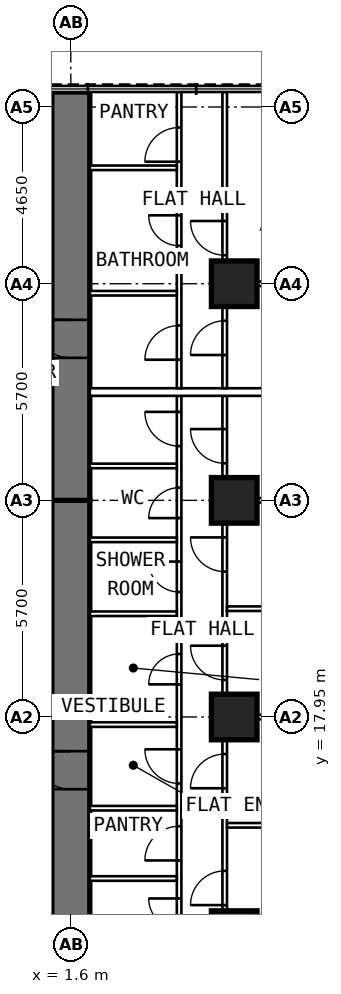
"""IFC4 building model, lengths in metres.
Left out: names, types, materials, properties, quantities, classifications, styles, units other than length and angle.
Written with IfcOpenShell. Run it as: python <this file> out.ifc"""

import sys

from ifc_helpers import new_model, si_unit, direction, frame, frame_2d, origin, origin_2d, place, context, subcontext, project, spatial, rectangle, extrude, element, fill, save


model = new_model("IFC4")
c1 = context("Model", 3, precision=1e-05, world=origin(), true_north=direction((0.0, 1.0)))
c2 = subcontext(c1, "Body", "Model", "MODEL_VIEW")
j1 = project(units=[si_unit("LENGTHUNIT", "METRE"), si_unit("PLANEANGLEUNIT", "RADIAN")], contexts=[c1])
p1 = place(None, origin())
s1 = spatial("IfcSite", under=j1, at=p1, CompositionType="ELEMENT")
p2 = place(p1, origin())
s2 = spatial("IfcBuilding", under=s1, at=p2, CompositionType="ELEMENT")
p3 = place(p2, frame((0.0, 0.0, 50.2)))
s3 = spatial("IfcBuildingStorey", under=s2, at=p3, CompositionType="ELEMENT", Elevation=50.2)
for number, where, z_axis, x_axis in (
    (1, (5.9, 12.25, 0.0), (0.0, 0.0, 1.0), (0.0, 1.0, 0.0)),
    (2, (5.9, 17.95, 0.0), (0.0, 0.0, 1.0), (0.0, 1.0, 0.0)),
    (3, (5.9, 23.65, 0.0), (0.0, 0.0, 1.0), (0.0, 1.0, 0.0)),
    (4, (5.9, 29.35, 0.0), (0.0, 0.0, 1.0), (0.0, 1.0, 0.0)),
):
    element("IfcColumn", number, at=place(p3, frame(where, z_axis=z_axis, x_axis=x_axis)), inside=s3, PredefinedType="COLUMN", context=c2, shape_type="SweptSolid", body=[
        extrude(rectangle(XDim=1.2, YDim=1.2, at=origin_2d()), origin(), (0.0, 0.0, 1.0), 3.6),
    ])
p4 = place(p3, frame((1.6, 9.6, 0.0), z_axis=(0.0, 0.0, 1.0), x_axis=(0.0, 1.0, 0.0)))
e5 = element("IfcWall", 5, at=p4, inside=s3, PredefinedType="SHEAR", context=c2, shape_type="SweptSolid", body=[
    extrude(rectangle(XDim=8.35, YDim=1.0, at=frame_2d((4.175, 0.0))), origin(), (0.0, 0.0, 1.0), 3.6),
])
p5 = place(p4, frame((6.45, 0.0, 0.0)))
e6 = element("IfcOpeningElement", 6, at=p5, cuts=e5, PredefinedType="OPENING", context=c2, shape_type="SweptSolid", body=[
    extrude(rectangle(XDim=1.0, YDim=2.1, at=frame_2d((0.5, 1.05))), frame((0.0, 0.512, 0.0), z_axis=(0.0, -1.0, 0.0), x_axis=(1.0, 0.0, 0.0)), (0.0, 0.0, 1.0), 1.024),
])
p6 = place(p3, frame((1.6, 17.95, 0.0), z_axis=(0.0, 0.0, 1.0), x_axis=(0.0, 1.0, 0.0)))
e7 = element("IfcWall", 7, at=p6, inside=s3, PredefinedType="SHEAR", context=c2, shape_type="SweptSolid", body=[
    extrude(rectangle(XDim=5.7, YDim=1.0, at=frame_2d((2.85, 0.0))), origin(), (0.0, 0.0, 1.0), 3.6),
])
p7 = place(p3, frame((1.6, 23.65, 0.0), z_axis=(0.0, 0.0, 1.0), x_axis=(0.0, 1.0, 0.0)))
e8 = element("IfcWall", 8, at=p7, inside=s3, PredefinedType="SHEAR", context=c2, shape_type="SweptSolid", body=[
    extrude(rectangle(XDim=10.745, YDim=1.0, at=frame_2d((5.373, 0.0))), origin(), (0.0, 0.0, 1.0), 3.6),
])
p8 = place(p7, frame((3.75, 0.0, 0.0)))
e9 = element("IfcOpeningElement", 9, at=p8, cuts=e8, PredefinedType="OPENING", context=c2, shape_type="SweptSolid", body=[
    extrude(rectangle(XDim=1.0, YDim=2.1, at=frame_2d((0.5, 1.05))), frame((0.0, 0.512, 0.0), z_axis=(0.0, -1.0, 0.0), x_axis=(1.0, 0.0, 0.0)), (0.0, 0.0, 1.0), 1.024),
])
p9 = place(p3, frame((4.45, 10.1, 0.0), z_axis=(0.0, 0.0, 1.0), x_axis=(0.0, 1.0, 0.0)))
e10 = element("IfcWall", 10, at=p9, inside=s3, PredefinedType="PARTITIONING", context=c2, shape_type="SweptSolid", body=[
    extrude(rectangle(XDim=16.3, YDim=0.12, at=frame_2d((8.15, 0.0))), origin(), (0.0, 0.0, 1.0), 3.35),
])
p10 = place(p9, frame((0.375, 0.0, 0.0)))
e11 = element("IfcOpeningElement", 11, at=p10, cuts=e10, PredefinedType="OPENING", context=c2, shape_type="SweptSolid", body=[
    extrude(rectangle(XDim=0.9, YDim=2.1, at=frame_2d((0.45, 1.05))), frame((0.0, 0.072, 0.0), z_axis=(0.0, -1.0, 0.0), x_axis=(1.0, 0.0, 0.0)), (0.0, 0.0, 1.0), 0.144),
])
p11 = place(p9, frame((2.275, 0.0, 0.0)))
e12 = element("IfcOpeningElement", 12, at=p11, cuts=e10, PredefinedType="OPENING", context=c2, shape_type="SweptSolid", body=[
    extrude(rectangle(XDim=0.8, YDim=2.1, at=frame_2d((0.4, 1.05))), frame((0.0, 0.072, 0.0), z_axis=(0.0, -1.0, 0.0), x_axis=(1.0, 0.0, 0.0)), (0.0, 0.0, 1.0), 0.144),
])
p12 = place(p9, frame((4.075, 0.0, 0.0)))
e13 = element("IfcOpeningElement", 13, at=p12, cuts=e10, PredefinedType="OPENING", context=c2, shape_type="SweptSolid", body=[
    extrude(rectangle(XDim=0.9, YDim=2.1, at=frame_2d((0.45, 1.05))), frame((0.0, 0.072, 0.0), z_axis=(0.0, -1.0, 0.0), x_axis=(1.0, 0.0, 0.0)), (0.0, 0.0, 1.0), 0.144),
])
p13 = place(p9, frame((6.1, 0.0, 0.0)))
e14 = element("IfcOpeningElement", 14, at=p13, cuts=e10, PredefinedType="OPENING", context=c2, shape_type="SweptSolid", body=[
    extrude(rectangle(XDim=0.9, YDim=2.1, at=frame_2d((0.45, 1.05))), frame((0.0, 0.072, 0.0), z_axis=(0.0, -1.0, 0.0), x_axis=(1.0, 0.0, 0.0)), (0.0, 0.0, 1.0), 0.144),
])
p14 = place(p9, frame((8.708, 0.0, 0.0)))
e15 = element("IfcOpeningElement", 15, at=p14, cuts=e10, PredefinedType="OPENING", context=c2, shape_type="SweptSolid", body=[
    extrude(rectangle(XDim=0.8, YDim=2.1, at=frame_2d((0.4, 1.05))), frame((0.0, 0.072, 0.0), z_axis=(0.0, -1.0, 0.0), x_axis=(1.0, 0.0, 0.0)), (0.0, 0.0, 1.0), 0.144),
])
p15 = place(p9, frame((11.139, 0.0, 0.0)))
e16 = element("IfcOpeningElement", 16, at=p15, cuts=e10, PredefinedType="OPENING", context=c2, shape_type="SweptSolid", body=[
    extrude(rectangle(XDim=0.8, YDim=2.1, at=frame_2d((0.4, 1.05))), frame((0.0, 0.072, 0.0), z_axis=(0.0, -1.0, 0.0), x_axis=(1.0, 0.0, 0.0)), (0.0, 0.0, 1.0), 0.144),
])
p16 = place(p9, frame((13.083, 0.0, 0.0)))
e17 = element("IfcOpeningElement", 17, at=p16, cuts=e10, PredefinedType="OPENING", context=c2, shape_type="SweptSolid", body=[
    extrude(rectangle(XDim=0.8, YDim=2.1, at=frame_2d((0.4, 1.05))), frame((0.0, 0.072, 0.0), z_axis=(0.0, -1.0, 0.0), x_axis=(1.0, 0.0, 0.0)), (0.0, 0.0, 1.0), 0.144),
])
p17 = place(p9, frame((14.978, 0.0, 0.0)))
e18 = element("IfcOpeningElement", 18, at=p17, cuts=e10, PredefinedType="OPENING", context=c2, shape_type="SweptSolid", body=[
    extrude(rectangle(XDim=0.9, YDim=2.1, at=frame_2d((0.45, 1.05))), frame((0.0, 0.072, 0.0), z_axis=(0.0, -1.0, 0.0), x_axis=(1.0, 0.0, 0.0)), (0.0, 0.0, 1.0), 0.144),
])
p18 = place(p3, frame((5.65, 9.6, 0.0), z_axis=(0.0, 0.0, 1.0), x_axis=(0.0, 1.0, 0.0)))
e19 = element("IfcWall", 19, at=p18, inside=s3, PredefinedType="PARTITIONING", context=c2, shape_type="SweptSolid", body=[
    extrude(rectangle(XDim=16.8, YDim=0.12, at=frame_2d((8.4, 0.0))), origin(), (0.0, 0.0, 1.0), 3.35),
])
p19 = place(p18, frame((3.4, 0.0, 0.0)))
e20 = element("IfcOpeningElement", 20, at=p19, cuts=e19, PredefinedType="OPENING", context=c2, shape_type="SweptSolid", body=[
    extrude(rectangle(XDim=0.9, YDim=2.1, at=frame_2d((0.45, 1.05))), frame((0.0, 0.072, 0.0), z_axis=(0.0, -1.0, 0.0), x_axis=(1.0, 0.0, 0.0)), (0.0, 0.0, 1.0), 0.144),
])
p20 = place(p18, frame((6.475, 0.0, 0.0)))
e21 = element("IfcOpeningElement", 21, at=p20, cuts=e19, PredefinedType="OPENING", context=c2, shape_type="SweptSolid", body=[
    extrude(rectangle(XDim=0.9, YDim=2.1, at=frame_2d((0.45, 1.05))), frame((0.0, 0.072, 0.0), z_axis=(0.0, -1.0, 0.0), x_axis=(1.0, 0.0, 0.0)), (0.0, 0.0, 1.0), 0.144),
])
p21 = place(p18, frame((9.325, 0.0, 0.0)))
e22 = element("IfcOpeningElement", 22, at=p21, cuts=e19, PredefinedType="OPENING", context=c2, shape_type="SweptSolid", body=[
    extrude(rectangle(XDim=0.9, YDim=2.1, at=frame_2d((0.45, 1.05))), frame((0.0, 0.072, 0.0), z_axis=(0.0, -1.0, 0.0), x_axis=(1.0, 0.0, 0.0)), (0.0, 0.0, 1.0), 0.144),
])
p22 = place(p18, frame((12.175, 0.0, 0.0)))
e23 = element("IfcOpeningElement", 23, at=p22, cuts=e19, PredefinedType="OPENING", context=c2, shape_type="SweptSolid", body=[
    extrude(rectangle(XDim=0.9, YDim=2.1, at=frame_2d((0.45, 1.05))), frame((0.0, 0.072, 0.0), z_axis=(0.0, -1.0, 0.0), x_axis=(1.0, 0.0, 0.0)), (0.0, 0.0, 1.0), 0.144),
])
p23 = place(p18, frame((15.025, 0.0, 0.0)))
e24 = element("IfcOpeningElement", 24, at=p23, cuts=e19, PredefinedType="OPENING", context=c2, shape_type="SweptSolid", body=[
    extrude(rectangle(XDim=0.9, YDim=2.1, at=frame_2d((0.45, 1.05))), frame((0.0, 0.072, 0.0), z_axis=(0.0, -1.0, 0.0), x_axis=(1.0, 0.0, 0.0)), (0.0, 0.0, 1.0), 0.144),
])
p24 = place(p3, frame((5.71, 15.1, 0.0), z_axis=(0.0, 0.0, 1.0), x_axis=(1.0, 0.0, 0.0)))
e25 = element("IfcWall", 25, at=p24, inside=s3, PredefinedType="PARTITIONING", context=c2, shape_type="SweptSolid", body=[
    extrude(rectangle(XDim=4.99, YDim=0.12, at=frame_2d((2.495, 0.0))), origin(), (0.0, 0.0, 1.0), 3.35),
])
p25 = place(p3, frame((5.71, 17.95, 0.0), z_axis=(0.0, 0.0, 1.0), x_axis=(1.0, 0.0, 0.0)))
e26 = element("IfcWall", 26, at=p25, inside=s3, PredefinedType="PARTITIONING", context=c2, shape_type="SweptSolid", body=[
    extrude(rectangle(XDim=4.99, YDim=0.12, at=frame_2d((2.495, 0.0))), origin(), (0.0, 0.0, 1.0), 2.45),
])
p26 = place(p3, frame((5.71, 20.8, 0.0), z_axis=(0.0, 0.0, 1.0), x_axis=(1.0, 0.0, 0.0)))
e27 = element("IfcWall", 27, at=p26, inside=s3, PredefinedType="PARTITIONING", context=c2, shape_type="SweptSolid", body=[
    extrude(rectangle(XDim=4.99, YDim=0.12, at=frame_2d((2.495, 0.0))), origin(), (0.0, 0.0, 1.0), 3.35),
])
p27 = place(p3, frame((5.71, 23.65, 0.0), z_axis=(0.0, 0.0, 1.0), x_axis=(1.0, 0.0, 0.0)))
e28 = element("IfcWall", 28, at=p27, inside=s3, PredefinedType="PARTITIONING", context=c2, shape_type="SweptSolid", body=[
    extrude(rectangle(XDim=4.99, YDim=0.12, at=frame_2d((2.495, 0.0))), origin(), (0.0, 0.0, 1.0), 2.45),
])
for number, where, z_axis, x_axis in (
    (29, (2.1, 13.7, 0.0), (0.0, 0.0, 1.0), (1.0, 0.0, 0.0)),
    (30, (2.1, 15.55, 0.0), (0.0, 0.0, 1.0), (1.0, 0.0, 0.0)),
):
    element("IfcWall", number, at=place(p3, frame(where, z_axis=z_axis, x_axis=x_axis)), inside=s3, PredefinedType="PARTITIONING", context=c2, shape_type="SweptSolid", body=[
        extrude(rectangle(XDim=2.29, YDim=0.12, at=frame_2d((1.145, 0.0))), origin(), (0.0, 0.0, 1.0), 3.35),
    ])
p28 = place(p3, frame((2.1, 17.75, 0.0), z_axis=(0.0, 0.0, 1.0), x_axis=(1.0, 0.0, 0.0)))
e31 = element("IfcWall", 31, at=p28, inside=s3, PredefinedType="PARTITIONING", context=c2, shape_type="SweptSolid", body=[
    extrude(rectangle(XDim=2.29, YDim=0.12, at=frame_2d((1.145, 0.0))), origin(), (0.0, 0.0, 1.0), 2.45),
])
for number, where, z_axis, x_axis in (
    (32, (2.1, 20.667, 0.0), (0.0, 0.0, 1.0), (1.0, 0.0, 0.0)),
    (33, (2.1, 22.611, 0.0), (0.0, 0.0, 1.0), (1.0, 0.0, 0.0)),
    (34, (2.1, 24.556, 0.0), (0.0, 0.0, 1.0), (1.0, 0.0, 0.0)),
):
    element("IfcWall", number, at=place(p3, frame(where, z_axis=z_axis, x_axis=x_axis)), inside=s3, PredefinedType="PARTITIONING", context=c2, shape_type="SweptSolid", body=[
        extrude(rectangle(XDim=2.29, YDim=0.12, at=frame_2d((1.145, 0.0))), origin(), (0.0, 0.0, 1.0), 3.35),
    ])
p29 = place(p3, frame((4.45, 26.6, 0.0), z_axis=(0.0, 0.0, 1.0), x_axis=(0.0, 1.0, 0.0)))
e35 = element("IfcWall", 35, at=p29, inside=s3, PredefinedType="PARTITIONING", context=c2, shape_type="SweptSolid", body=[
    extrude(rectangle(XDim=7.795, YDim=0.12, at=frame_2d((3.897, 0.0))), origin(), (0.0, 0.0, 1.0), 3.35),
])
p30 = place(p29, frame((0.75, 0.0, 0.0)))
e36 = element("IfcOpeningElement", 36, at=p30, cuts=e35, PredefinedType="OPENING", context=c2, shape_type="SweptSolid", body=[
    extrude(rectangle(XDim=0.9, YDim=2.1, at=frame_2d((0.45, 1.05))), frame((0.0, 0.072, 0.0), z_axis=(0.0, -1.0, 0.0), x_axis=(1.0, 0.0, 0.0)), (0.0, 0.0, 1.0), 0.144),
])
p31 = place(p29, frame((3.75, 0.0, 0.0)))
e37 = element("IfcOpeningElement", 37, at=p31, cuts=e35, PredefinedType="OPENING", context=c2, shape_type="SweptSolid", body=[
    extrude(rectangle(XDim=0.8, YDim=2.1, at=frame_2d((0.4, 1.05))), frame((0.0, 0.072, 0.0), z_axis=(0.0, -1.0, 0.0), x_axis=(1.0, 0.0, 0.0)), (0.0, 0.0, 1.0), 0.144),
])
p32 = place(p29, frame((5.96, 0.0, 0.0)))
e38 = element("IfcOpeningElement", 38, at=p32, cuts=e35, PredefinedType="OPENING", context=c2, shape_type="SweptSolid", body=[
    extrude(rectangle(XDim=0.9, YDim=2.1, at=frame_2d((0.45, 1.05))), frame((0.0, 0.072, 0.0), z_axis=(0.0, -1.0, 0.0), x_axis=(1.0, 0.0, 0.0)), (0.0, 0.0, 1.0), 0.144),
])
p33 = place(p3, frame((5.65, 26.6, 0.0), z_axis=(0.0, 0.0, 1.0), x_axis=(0.0, 1.0, 0.0)))
e39 = element("IfcWall", 39, at=p33, inside=s3, PredefinedType="PARTITIONING", context=c2, shape_type="SweptSolid", body=[
    extrude(rectangle(XDim=7.795, YDim=0.12, at=frame_2d((3.897, 0.0))), origin(), (0.0, 0.0, 1.0), 3.35),
])
p34 = place(p33, frame((0.875, 0.0, 0.0)))
e40 = element("IfcOpeningElement", 40, at=p34, cuts=e39, PredefinedType="OPENING", context=c2, shape_type="SweptSolid", body=[
    extrude(rectangle(XDim=0.9, YDim=2.1, at=frame_2d((0.45, 1.05))), frame((0.0, 0.072, 0.0), z_axis=(0.0, -1.0, 0.0), x_axis=(1.0, 0.0, 0.0)), (0.0, 0.0, 1.0), 0.144),
])
p35 = place(p33, frame((3.5, 0.0, 0.0)))
e41 = element("IfcOpeningElement", 41, at=p35, cuts=e39, PredefinedType="OPENING", context=c2, shape_type="SweptSolid", body=[
    extrude(rectangle(XDim=0.9, YDim=2.1, at=frame_2d((0.45, 1.05))), frame((0.0, 0.072, 0.0), z_axis=(0.0, -1.0, 0.0), x_axis=(1.0, 0.0, 0.0)), (0.0, 0.0, 1.0), 0.144),
])
p36 = place(p3, frame((5.71, 29.35, 0.0), z_axis=(0.0, 0.0, 1.0), x_axis=(1.0, 0.0, 0.0)))
e42 = element("IfcWall", 42, at=p36, inside=s3, PredefinedType="PARTITIONING", context=c2, shape_type="SweptSolid", body=[
    extrude(rectangle(XDim=4.99, YDim=0.12, at=frame_2d((2.495, 0.0))), origin(), (0.0, 0.0, 1.0), 2.45),
])
p37 = place(p3, frame((2.1, 29.1, 0.0), z_axis=(0.0, 0.0, 1.0), x_axis=(1.0, 0.0, 0.0)))
e43 = element("IfcWall", 43, at=p37, inside=s3, PredefinedType="PARTITIONING", context=c2, shape_type="SweptSolid", body=[
    extrude(rectangle(XDim=2.29, YDim=0.12, at=frame_2d((1.145, 0.0))), origin(), (0.0, 0.0, 1.0), 2.45),
])
p38 = place(p3, frame((2.1, 32.4, 0.0), z_axis=(0.0, 0.0, 1.0), x_axis=(1.0, 0.0, 0.0)))
e44 = element("IfcWall", 44, at=p38, inside=s3, PredefinedType="PARTITIONING", context=c2, shape_type="SweptSolid", body=[
    extrude(rectangle(XDim=2.29, YDim=0.12, at=frame_2d((1.145, 0.0))), origin(), (0.0, 0.0, 1.0), 3.35),
])
p39 = place(p3, frame((2.1, 26.5, 0.0), z_axis=(0.0, 0.0, 1.0), x_axis=(1.0, 0.0, 0.0)))
e45 = element("IfcWall", 45, at=p39, inside=s3, PredefinedType="PARTITIONING", context=c2, shape_type="SweptSolid", body=[
    extrude(rectangle(XDim=8.6, YDim=0.2, at=frame_2d((4.3, 0.0))), origin(), (0.0, 0.0, 1.0), 3.35),
])
p40 = place(p5, origin())
e46 = element("IfcDoor", 46, at=p40, inside=s3, OperationType="SINGLE_SWING_RIGHT", PredefinedType="DOOR", context=c2, shape_type="SweptSolid", body=[
    extrude(rectangle(XDim=1.0, YDim=2.1, at=frame_2d((0.5, 1.05))), frame((0.0, 0.25, 0.0), z_axis=(0.0, -1.0, 0.0), x_axis=(1.0, 0.0, 0.0)), (0.0, 0.0, 1.0), 0.5),
])
fill(e6, e46)
p41 = place(p19, origin())
e47 = element("IfcDoor", 47, at=p41, inside=s3, OperationType="SINGLE_SWING_LEFT", PredefinedType="DOOR", context=c2, shape_type="SweptSolid", body=[
    extrude(rectangle(XDim=0.9, YDim=2.1, at=frame_2d((0.45, 1.05))), frame((0.0, 0.025, 0.0), z_axis=(0.0, -1.0, 0.0), x_axis=(1.0, 0.0, 0.0)), (0.0, 0.0, 1.0), 0.05),
])
fill(e20, e47)
p42 = place(p20, origin())
e48 = element("IfcDoor", 48, at=p42, inside=s3, OperationType="SINGLE_SWING_LEFT", PredefinedType="DOOR", context=c2, shape_type="SweptSolid", body=[
    extrude(rectangle(XDim=0.9, YDim=2.1, at=frame_2d((0.45, 1.05))), frame((0.0, 0.025, 0.0), z_axis=(0.0, -1.0, 0.0), x_axis=(1.0, 0.0, 0.0)), (0.0, 0.0, 1.0), 0.05),
])
fill(e21, e48)
p43 = place(p21, origin())
e49 = element("IfcDoor", 49, at=p43, inside=s3, OperationType="SINGLE_SWING_RIGHT", PredefinedType="DOOR", context=c2, shape_type="SweptSolid", body=[
    extrude(rectangle(XDim=0.9, YDim=2.1, at=frame_2d((0.45, 1.05))), frame((0.0, 0.025, 0.0), z_axis=(0.0, -1.0, 0.0), x_axis=(1.0, 0.0, 0.0)), (0.0, 0.0, 1.0), 0.05),
])
fill(e22, e49)
p44 = place(p22, origin())
e50 = element("IfcDoor", 50, at=p44, inside=s3, OperationType="SINGLE_SWING_RIGHT", PredefinedType="DOOR", context=c2, shape_type="SweptSolid", body=[
    extrude(rectangle(XDim=0.9, YDim=2.1, at=frame_2d((0.45, 1.05))), frame((0.0, 0.025, 0.0), z_axis=(0.0, -1.0, 0.0), x_axis=(1.0, 0.0, 0.0)), (0.0, 0.0, 1.0), 0.05),
])
fill(e23, e50)
p45 = place(p23, origin())
e51 = element("IfcDoor", 51, at=p45, inside=s3, OperationType="SINGLE_SWING_RIGHT", PredefinedType="DOOR", context=c2, shape_type="SweptSolid", body=[
    extrude(rectangle(XDim=0.9, YDim=2.1, at=frame_2d((0.45, 1.05))), frame((0.0, 0.025, 0.0), z_axis=(0.0, -1.0, 0.0), x_axis=(1.0, 0.0, 0.0)), (0.0, 0.0, 1.0), 0.05),
])
fill(e24, e51)
p46 = place(p11, origin())
e52 = element("IfcDoor", 52, at=p46, inside=s3, OperationType="SINGLE_SWING_RIGHT", PredefinedType="DOOR", context=c2, shape_type="SweptSolid", body=[
    extrude(rectangle(XDim=0.8, YDim=2.1, at=frame_2d((0.4, 1.05))), frame((0.0, 0.025, 0.0), z_axis=(0.0, -1.0, 0.0), x_axis=(1.0, 0.0, 0.0)), (0.0, 0.0, 1.0), 0.05),
])
fill(e12, e52)
p47 = place(p12, origin())
e53 = element("IfcDoor", 53, at=p47, inside=s3, OperationType="SINGLE_SWING_LEFT", PredefinedType="DOOR", context=c2, shape_type="SweptSolid", body=[
    extrude(rectangle(XDim=0.9, YDim=2.1, at=frame_2d((0.45, 1.05))), frame((0.0, 0.025, 0.0), z_axis=(0.0, -1.0, 0.0), x_axis=(1.0, 0.0, 0.0)), (0.0, 0.0, 1.0), 0.05),
])
fill(e13, e53)
p48 = place(p13, origin())
e54 = element("IfcDoor", 54, at=p48, inside=s3, OperationType="SINGLE_SWING_RIGHT", PredefinedType="DOOR", context=c2, shape_type="SweptSolid", body=[
    extrude(rectangle(XDim=0.9, YDim=2.1, at=frame_2d((0.45, 1.05))), frame((0.0, 0.025, 0.0), z_axis=(0.0, -1.0, 0.0), x_axis=(1.0, 0.0, 0.0)), (0.0, 0.0, 1.0), 0.05),
])
fill(e14, e54)
p49 = place(p14, origin())
e55 = element("IfcDoor", 55, at=p49, inside=s3, OperationType="SINGLE_SWING_LEFT", PredefinedType="DOOR", context=c2, shape_type="SweptSolid", body=[
    extrude(rectangle(XDim=0.8, YDim=2.1, at=frame_2d((0.4, 1.05))), frame((0.0, 0.025, 0.0), z_axis=(0.0, -1.0, 0.0), x_axis=(1.0, 0.0, 0.0)), (0.0, 0.0, 1.0), 0.05),
])
fill(e15, e55)
p50 = place(p15, origin())
e56 = element("IfcDoor", 56, at=p50, inside=s3, OperationType="SINGLE_SWING_RIGHT", PredefinedType="DOOR", context=c2, shape_type="SweptSolid", body=[
    extrude(rectangle(XDim=0.8, YDim=2.1, at=frame_2d((0.4, 1.05))), frame((0.0, 0.025, 0.0), z_axis=(0.0, -1.0, 0.0), x_axis=(1.0, 0.0, 0.0)), (0.0, 0.0, 1.0), 0.05),
])
fill(e16, e56)
p51 = place(p16, origin())
e57 = element("IfcDoor", 57, at=p51, inside=s3, OperationType="SINGLE_SWING_LEFT", PredefinedType="DOOR", context=c2, shape_type="SweptSolid", body=[
    extrude(rectangle(XDim=0.8, YDim=2.1, at=frame_2d((0.4, 1.05))), frame((0.0, 0.025, 0.0), z_axis=(0.0, -1.0, 0.0), x_axis=(1.0, 0.0, 0.0)), (0.0, 0.0, 1.0), 0.05),
])
fill(e17, e57)
p52 = place(p17, origin())
e58 = element("IfcDoor", 58, at=p52, inside=s3, OperationType="SINGLE_SWING_RIGHT", PredefinedType="DOOR", context=c2, shape_type="SweptSolid", body=[
    extrude(rectangle(XDim=0.9, YDim=2.1, at=frame_2d((0.45, 1.05))), frame((0.0, 0.025, 0.0), z_axis=(0.0, -1.0, 0.0), x_axis=(1.0, 0.0, 0.0)), (0.0, 0.0, 1.0), 0.05),
])
fill(e18, e58)
p53 = place(p8, origin())
e59 = element("IfcDoor", 59, at=p53, inside=s3, OperationType="SINGLE_SWING_RIGHT", PredefinedType="DOOR", context=c2, shape_type="SweptSolid", body=[
    extrude(rectangle(XDim=1.0, YDim=2.1, at=frame_2d((0.5, 1.05))), frame((0.0, 0.25, 0.0), z_axis=(0.0, -1.0, 0.0), x_axis=(1.0, 0.0, 0.0)), (0.0, 0.0, 1.0), 0.5),
])
fill(e9, e59)
p54 = place(p34, origin())
e60 = element("IfcDoor", 60, at=p54, inside=s3, OperationType="SINGLE_SWING_LEFT", PredefinedType="DOOR", context=c2, shape_type="SweptSolid", body=[
    extrude(rectangle(XDim=0.9, YDim=2.1, at=frame_2d((0.45, 1.05))), frame((0.0, 0.025, 0.0), z_axis=(0.0, -1.0, 0.0), x_axis=(1.0, 0.0, 0.0)), (0.0, 0.0, 1.0), 0.05),
])
fill(e40, e60)
p55 = place(p35, origin())
e61 = element("IfcDoor", 61, at=p55, inside=s3, OperationType="SINGLE_SWING_RIGHT", PredefinedType="DOOR", context=c2, shape_type="SweptSolid", body=[
    extrude(rectangle(XDim=0.9, YDim=2.1, at=frame_2d((0.45, 1.05))), frame((0.0, 0.025, 0.0), z_axis=(0.0, -1.0, 0.0), x_axis=(1.0, 0.0, 0.0)), (0.0, 0.0, 1.0), 0.05),
])
fill(e41, e61)
p56 = place(p30, origin())
e62 = element("IfcDoor", 62, at=p56, inside=s3, OperationType="SINGLE_SWING_LEFT", PredefinedType="DOOR", context=c2, shape_type="SweptSolid", body=[
    extrude(rectangle(XDim=0.9, YDim=2.1, at=frame_2d((0.45, 1.05))), frame((0.0, 0.025, 0.0), z_axis=(0.0, -1.0, 0.0), x_axis=(1.0, 0.0, 0.0)), (0.0, 0.0, 1.0), 0.05),
])
fill(e36, e62)
p57 = place(p31, origin())
e63 = element("IfcDoor", 63, at=p57, inside=s3, OperationType="SINGLE_SWING_RIGHT", PredefinedType="DOOR", context=c2, shape_type="SweptSolid", body=[
    extrude(rectangle(XDim=0.8, YDim=2.1, at=frame_2d((0.4, 1.05))), frame((0.0, 0.025, 0.0), z_axis=(0.0, -1.0, 0.0), x_axis=(1.0, 0.0, 0.0)), (0.0, 0.0, 1.0), 0.05),
])
fill(e37, e63)
p58 = place(p32, origin())
e64 = element("IfcDoor", 64, at=p58, inside=s3, OperationType="SINGLE_SWING_LEFT", PredefinedType="DOOR", context=c2, shape_type="SweptSolid", body=[
    extrude(rectangle(XDim=0.9, YDim=2.1, at=frame_2d((0.45, 1.05))), frame((0.0, 0.025, 0.0), z_axis=(0.0, -1.0, 0.0), x_axis=(1.0, 0.0, 0.0)), (0.0, 0.0, 1.0), 0.05),
])
fill(e38, e64)
save(model, sys.argv[1])
